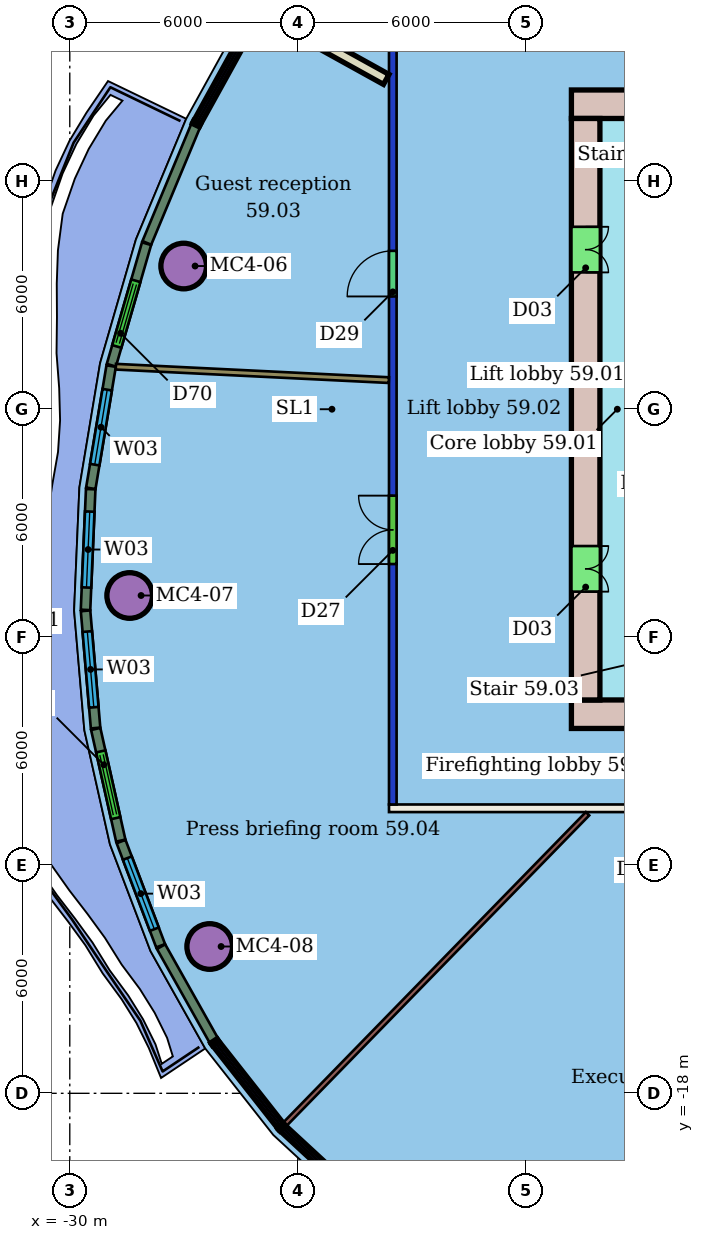
"""IFC4 building model, lengths in metres.
Left out: names, types, materials, properties, quantities, classifications, styles, units other than length and angle.
Written with IfcOpenShell. Run it as: python <this file> out.ifc"""

import sys

from ifc_helpers import new_model, si_unit, direction, frame, frame_2d, origin, origin_2d, place, context, subcontext, project, spatial, rectangle, hollow_circle, extrude, element, fill, save


model = new_model("IFC4")
c1 = context("Model", 3, precision=1e-05, world=origin(), true_north=direction((0.0, 1.0)))
c2 = subcontext(c1, "Body", "Model", "MODEL_VIEW")
j1 = project(units=[si_unit("LENGTHUNIT", "METRE"), si_unit("PLANEANGLEUNIT", "RADIAN")], contexts=[c1])
p1 = place(None, origin())
s1 = spatial("IfcSite", under=j1, at=p1, CompositionType="ELEMENT")
p2 = place(p1, origin())
s2 = spatial("IfcBuilding", under=s1, at=p2, CompositionType="ELEMENT")
p3 = place(p2, frame((0.0, 0.0, 238.9)))
s3 = spatial("IfcBuildingStorey", under=s2, at=p3, CompositionType="ELEMENT", Elevation=238.9)
for number, where, z_axis, x_axis in (
    (1, (-27.003, 3.768, 0.0), (0.0, 0.0, 1.0), (1.0, 0.0, 0.0)),
    (2, (-28.424, -4.901, 0.0), (0.0, 0.0, 1.0), (1.0, 0.0, 0.0)),
    (3, (-26.318, -14.137, 0.0), (0.0, 0.0, 1.0), (1.0, 0.0, 0.0)),
):
    element("IfcColumn", number, at=place(p3, frame(where, z_axis=z_axis, x_axis=x_axis)), inside=s3, PredefinedType="COLUMN", context=c2, shape_type="SweptSolid", body=[
        extrude(hollow_circle(Radius=0.6, WallThickness=0.045, at=origin_2d()), origin(), (0.0, 0.0, 1.0), 3.4),
    ])
p4 = place(p3, frame((9.6, -10.5, 0.0), z_axis=(0.0, 0.0, 1.0), x_axis=(-1.0, 0.0, 0.0)))
e4 = element("IfcWall", 4, at=p4, inside=s3, PredefinedType="PARTITIONING", context=c2, shape_type="SweptSolid", body=[
    extrude(rectangle(XDim=31.2, YDim=0.2, at=frame_2d((15.6, 0.0))), origin(), (0.0, 0.0, 1.0), 3.4),
])
p5 = place(p4, frame((21.354, 0.0, 0.0)))
e5 = element("IfcOpeningElement", 5, at=p5, cuts=e4, PredefinedType="OPENING", context=c2, shape_type="SweptSolid", body=[
    extrude(rectangle(XDim=1.8, YDim=2.1, at=frame_2d((0.9, 1.05))), frame((0.0, 0.11, 0.0), z_axis=(0.0, -1.0, 0.0), x_axis=(1.0, 0.0, 0.0)), (0.0, 0.0, 1.0), 0.22),
])
p6 = place(p4, frame((9.369, 0.0, 0.0)))
e6 = element("IfcOpeningElement", 6, at=p6, cuts=e4, PredefinedType="OPENING", context=c2, shape_type="SweptSolid", body=[
    extrude(rectangle(XDim=1.8, YDim=2.1, at=frame_2d((0.9, 1.05))), frame((0.0, 0.11, 0.0), z_axis=(0.0, -1.0, 0.0), x_axis=(1.0, 0.0, 0.0)), (0.0, 0.0, 1.0), 0.22),
])
p7 = place(p3, frame((-21.5, -10.4, 0.0), z_axis=(0.0, 0.0, 1.0), x_axis=(0.0, 1.0, 0.0)))
e7 = element("IfcWall", 7, at=p7, inside=s3, PredefinedType="PARTITIONING", context=c2, shape_type="SweptSolid", body=[
    extrude(rectangle(XDim=20.8, YDim=0.2, at=frame_2d((10.4, 0.0))), origin(), (0.0, 0.0, 1.0), 3.0),
])
p8 = place(p7, frame((13.367, 0.0, 0.0)))
e8 = element("IfcOpeningElement", 8, at=p8, cuts=e7, PredefinedType="OPENING", context=c2, shape_type="SweptSolid", body=[
    extrude(rectangle(XDim=1.2, YDim=2.4, at=frame_2d((0.6, 1.2))), frame((0.0, 0.11, 0.0), z_axis=(0.0, -1.0, 0.0), x_axis=(1.0, 0.0, 0.0)), (0.0, 0.0, 1.0), 0.22),
])
p9 = place(p7, frame((6.326, 0.0, 0.0)))
e9 = element("IfcOpeningElement", 9, at=p9, cuts=e7, PredefinedType="OPENING", context=c2, shape_type="SweptSolid", body=[
    extrude(rectangle(XDim=1.8, YDim=2.4, at=frame_2d((0.9, 1.2))), frame((0.0, 0.11, 0.0), z_axis=(0.0, -1.0, 0.0), x_axis=(1.0, 0.0, 0.0)), (0.0, 0.0, 1.0), 0.22),
])
p10 = place(p3, frame((-24.895, 10.462, 0.0), z_axis=(0.0, 0.0, 1.0), x_axis=(0.874850568948, -0.484392900455, 0.0)))
e10 = element("IfcWall", 10, at=p10, inside=s3, PredefinedType="PARTITIONING", context=c2, shape_type="SweptSolid", body=[
    extrude(rectangle(XDim=3.683, YDim=0.3, at=frame_2d((1.841, 0.0))), origin(), (0.0, 0.0, 1.0), 3.4),
])
p11 = place(p3, frame((-28.788, 1.119, 0.0), z_axis=(0.0, 0.0, 1.0), x_axis=(0.998796383539, -0.049048794366, 0.0)))
e11 = element("IfcWall", 11, at=p11, inside=s3, PredefinedType="PARTITIONING", context=c2, shape_type="SweptSolid", body=[
    extrude(rectangle(XDim=7.192, YDim=0.15, at=frame_2d((3.596, 0.0))), origin(), (0.0, 0.0, 1.0), 3.4),
])
p12 = place(p3, frame((-24.333, -18.807, 0.0), z_axis=(0.0, 0.0, 1.0), x_axis=(0.698033160895, 0.716065434364, 0.0)))
e12 = element("IfcWall", 12, at=p12, inside=s3, PredefinedType="PARTITIONING", context=c2, shape_type="SweptSolid", body=[
    extrude(rectangle(XDim=11.4, YDim=0.125, at=frame_2d((5.7, 0.0))), origin(), (0.0, 0.0, 1.0), 3.4),
])
p13 = place(p3, frame((-26.688, 7.461, 0.0), z_axis=(0.0, 0.0, 1.0), x_axis=(-0.384516815747, -0.923117987263, 0.0)))
e13 = element("IfcWall", 13, at=p13, inside=s3, PredefinedType="SOLIDWALL", context=c2, shape_type="SweptSolid", body=[
    extrude(rectangle(XDim=3.342, YDim=0.25, at=frame_2d((1.671, 0.0))), origin(), (0.0, 0.0, 1.0), 3.05),
])
p14 = place(p3, frame((-27.98, 4.355, 0.0), z_axis=(0.0, 0.0, 1.0), x_axis=(-0.278253906266, -0.960507555227, 0.0)))
e14 = element("IfcWall", 14, at=p14, inside=s3, PredefinedType="SOLIDWALL", context=c2, shape_type="SweptSolid", body=[
    extrude(rectangle(XDim=3.33, YDim=0.25, at=frame_2d((1.665, 0.0))), origin(), (0.0, 0.0, 1.0), 3.05),
])
p15 = place(p14, frame((1.015, 0.0, 0.0)))
e15 = element("IfcOpeningElement", 15, at=p15, cuts=e14, PredefinedType="OPENING", context=c2, shape_type="SweptSolid", body=[
    extrude(rectangle(XDim=1.8, YDim=2.4, at=frame_2d((0.9, 1.2))), frame((0.0, 0.135, 0.0), z_axis=(0.0, -1.0, 0.0), x_axis=(1.0, 0.0, 0.0)), (0.0, 0.0, 1.0), 0.27),
])
p16 = place(p3, frame((-28.911, 1.135, 0.0), z_axis=(0.0, 0.0, 1.0), x_axis=(-0.164313973675, -0.986408089005, 0.0)))
e16 = element("IfcWall", 16, at=p16, inside=s3, PredefinedType="SOLIDWALL", context=c2, shape_type="SweptSolid", body=[
    extrude(rectangle(XDim=3.26, YDim=0.25, at=frame_2d((1.63, 0.0))), origin(), (0.0, 0.0, 1.0), 3.05),
])
p17 = place(p16, frame((0.63, 0.0, 0.9)))
e17 = element("IfcOpeningElement", 17, at=p17, cuts=e16, PredefinedType="OPENING", context=c2, shape_type="SweptSolid", body=[
    extrude(rectangle(XDim=2.0, YDim=2.1, at=frame_2d((1.0, 1.05))), frame((0.0, 0.135, 0.0), z_axis=(0.0, -1.0, 0.0), x_axis=(1.0, 0.0, 0.0)), (0.0, 0.0, 1.0), 0.27),
])
p18 = place(p3, frame((-29.449, -2.103, 0.0), z_axis=(0.0, 0.0, 1.0), x_axis=(-0.042837542995, -0.99908205114, 0.0)))
e18 = element("IfcWall", 18, at=p18, inside=s3, PredefinedType="SOLIDWALL", context=c2, shape_type="SweptSolid", body=[
    extrude(rectangle(XDim=3.18, YDim=0.25, at=frame_2d((1.59, 0.0))), origin(), (0.0, 0.0, 1.0), 3.05),
])
p19 = place(p18, frame((0.59, 0.0, 0.9)))
e19 = element("IfcOpeningElement", 19, at=p19, cuts=e18, PredefinedType="OPENING", context=c2, shape_type="SweptSolid", body=[
    extrude(rectangle(XDim=2.0, YDim=2.1, at=frame_2d((1.0, 1.05))), frame((0.0, 0.135, 0.0), z_axis=(0.0, -1.0, 0.0), x_axis=(1.0, 0.0, 0.0)), (0.0, 0.0, 1.0), 0.27),
])
p20 = place(p3, frame((-29.585, -5.304, 0.0), z_axis=(0.0, 0.0, 1.0), x_axis=(0.08534968294, -0.996351058424, 0.0)))
e20 = element("IfcWall", 20, at=p20, inside=s3, PredefinedType="SOLIDWALL", context=c2, shape_type="SweptSolid", body=[
    extrude(rectangle(XDim=3.095, YDim=0.25, at=frame_2d((1.547, 0.0))), origin(), (0.0, 0.0, 1.0), 3.05),
])
p21 = place(p20, frame((0.548, 0.0, 0.9)))
e21 = element("IfcOpeningElement", 21, at=p21, cuts=e20, PredefinedType="OPENING", context=c2, shape_type="SweptSolid", body=[
    extrude(rectangle(XDim=2.0, YDim=2.1, at=frame_2d((1.0, 1.05))), frame((0.0, 0.135, 0.0), z_axis=(0.0, -1.0, 0.0), x_axis=(1.0, 0.0, 0.0)), (0.0, 0.0, 1.0), 0.27),
])
p22 = place(p3, frame((-29.317, -8.413, 0.0), z_axis=(0.0, 0.0, 1.0), x_axis=(0.218861882791, -0.975755848694, 0.0)))
e22 = element("IfcWall", 22, at=p22, inside=s3, PredefinedType="SOLIDWALL", context=c2, shape_type="SweptSolid", body=[
    extrude(rectangle(XDim=3.011, YDim=0.25, at=frame_2d((1.505, 0.0))), origin(), (0.0, 0.0, 1.0), 3.05),
])
p23 = place(p22, frame((0.605, 0.0, 0.0)))
e23 = element("IfcOpeningElement", 23, at=p23, cuts=e22, PredefinedType="OPENING", context=c2, shape_type="SweptSolid", body=[
    extrude(rectangle(XDim=1.8, YDim=2.4, at=frame_2d((0.9, 1.2))), frame((0.0, 0.135, 0.0), z_axis=(0.0, -1.0, 0.0), x_axis=(1.0, 0.0, 0.0)), (0.0, 0.0, 1.0), 0.27),
])
p24 = place(p3, frame((-28.651, -11.375, 0.0), z_axis=(0.0, 0.0, 1.0), x_axis=(0.35511592295, -0.934822272556, 0.0)))
e24 = element("IfcWall", 24, at=p24, inside=s3, PredefinedType="SOLIDWALL", context=c2, shape_type="SweptSolid", body=[
    extrude(rectangle(XDim=2.933, YDim=0.25, at=frame_2d((1.466, 0.0))), origin(), (0.0, 0.0, 1.0), 3.05),
])
p25 = place(p24, frame((0.467, 0.0, 0.9)))
e25 = element("IfcOpeningElement", 25, at=p25, cuts=e24, PredefinedType="OPENING", context=c2, shape_type="SweptSolid", body=[
    extrude(rectangle(XDim=2.0, YDim=2.1, at=frame_2d((1.0, 1.05))), frame((0.0, 0.135, 0.0), z_axis=(0.0, -1.0, 0.0), x_axis=(1.0, 0.0, 0.0)), (0.0, 0.0, 1.0), 0.27),
])
p26 = place(p3, frame((-27.598, -14.141, 0.0), z_axis=(0.0, 0.0, 1.0), x_axis=(0.489949521211, -0.871750805371, 0.0)))
e26 = element("IfcWall", 26, at=p26, inside=s3, PredefinedType="SOLIDWALL", context=c2, shape_type="SweptSolid", body=[
    extrude(rectangle(XDim=2.826, YDim=0.25, at=frame_2d((1.413, 0.0))), origin(), (0.0, 0.0, 1.0), 3.05),
])
p27 = place(p3, frame((-6.0, 8.025, 0.0), z_axis=(0.0, 0.0, 1.0), x_axis=(-1.0, 0.0, 0.0)))
e27 = element("IfcWall", 27, at=p27, inside=s3, PredefinedType="SHEAR", context=c2, shape_type="SweptSolid", body=[
    extrude(rectangle(XDim=10.8, YDim=0.75, at=frame_2d((5.4, 0.0))), origin(), (0.0, 0.0, 1.0), 3.3),
])
p28 = place(p27, frame((5.2, 0.0, 0.0)))
e28 = element("IfcOpeningElement", 28, at=p28, cuts=e27, PredefinedType="OPENING", context=c2, shape_type="SweptSolid", body=[
    extrude(rectangle(XDim=1.2, YDim=2.1, at=frame_2d((0.6, 1.05))), frame((0.0, 0.385, 0.0), z_axis=(0.0, -1.0, 0.0), x_axis=(1.0, 0.0, 0.0)), (0.0, 0.0, 1.0), 0.77),
])
p29 = place(p3, frame((-16.8, -8.025, 0.0), z_axis=(0.0, 0.0, 1.0), x_axis=(1.0, 0.0, 0.0)))
e29 = element("IfcWall", 29, at=p29, inside=s3, PredefinedType="SHEAR", context=c2, shape_type="SweptSolid", body=[
    extrude(rectangle(XDim=21.6, YDim=0.75, at=frame_2d((10.8, 0.0))), origin(), (0.0, 0.0, 1.0), 3.3),
])
p30 = place(p29, frame((4.8, 0.0, 0.0)))
e30 = element("IfcOpeningElement", 30, at=p30, cuts=e29, PredefinedType="OPENING", context=c2, shape_type="SweptSolid", body=[
    extrude(rectangle(XDim=1.2, YDim=2.1, at=frame_2d((0.6, 1.05))), frame((0.0, 0.385, 0.0), z_axis=(0.0, -1.0, 0.0), x_axis=(1.0, 0.0, 0.0)), (0.0, 0.0, 1.0), 0.77),
])
p31 = place(p3, frame((-16.425, 7.65, 0.0), z_axis=(0.0, 0.0, 1.0), x_axis=(0.0, -1.0, 0.0)))
e31 = element("IfcWall", 31, at=p31, inside=s3, PredefinedType="SHEAR", context=c2, shape_type="SweptSolid", body=[
    extrude(rectangle(XDim=15.3, YDim=0.75, at=frame_2d((7.65, 0.0))), origin(), (0.0, 0.0, 1.0), 3.3),
])
p32 = place(p31, frame((11.25, 0.0, 0.0)))
e32 = element("IfcOpeningElement", 32, at=p32, cuts=e31, PredefinedType="OPENING", context=c2, shape_type="SweptSolid", body=[
    extrude(rectangle(XDim=1.2, YDim=2.1, at=frame_2d((0.6, 1.05))), frame((0.0, 0.385, 0.0), z_axis=(0.0, -1.0, 0.0), x_axis=(1.0, 0.0, 0.0)), (0.0, 0.0, 1.0), 0.77),
])
p33 = place(p31, frame((2.85, 0.0, 0.0)))
e33 = element("IfcOpeningElement", 33, at=p33, cuts=e31, PredefinedType="OPENING", context=c2, shape_type="SweptSolid", body=[
    extrude(rectangle(XDim=1.2, YDim=2.1, at=frame_2d((0.6, 1.05))), frame((0.0, 0.385, 0.0), z_axis=(0.0, -1.0, 0.0), x_axis=(1.0, 0.0, 0.0)), (0.0, 0.0, 1.0), 0.77),
])
p34 = place(p8, origin())
e34 = element("IfcDoor", 34, at=p34, inside=s3, OperationType="SINGLE_SWING_LEFT", PredefinedType="DOOR", context=c2, shape_type="SweptSolid", body=[
    extrude(rectangle(XDim=1.2, YDim=2.4, at=frame_2d((0.6, 1.2))), frame((0.0, 0.025, 0.0), z_axis=(0.0, -1.0, 0.0), x_axis=(1.0, 0.0, 0.0)), (0.0, 0.0, 1.0), 0.05),
])
fill(e8, e34)
p35 = place(p9, origin())
e35 = element("IfcDoor", 35, at=p35, inside=s3, OperationType="DOUBLE_DOOR_SINGLE_SWING", PredefinedType="DOOR", context=c2, shape_type="SweptSolid", body=[
    extrude(rectangle(XDim=1.8, YDim=2.4, at=frame_2d((0.9, 1.2))), frame((0.0, 0.025, 0.0), z_axis=(0.0, -1.0, 0.0), x_axis=(1.0, 0.0, 0.0)), (0.0, 0.0, 1.0), 0.05),
])
fill(e9, e35)
p36 = place(p15, origin())
e36 = element("IfcDoor", 36, at=p36, inside=s3, OperationType="DOUBLE_DOOR_SLIDING", PredefinedType="DOOR", context=c2, shape_type="SweptSolid", body=[
    extrude(rectangle(XDim=1.8, YDim=2.4, at=frame_2d((0.9, 1.2))), frame((0.0, 0.025, 0.0), z_axis=(0.0, -1.0, 0.0), x_axis=(1.0, 0.0, 0.0)), (0.0, 0.0, 1.0), 0.05),
])
fill(e15, e36)
p37 = place(p17, origin())
e37 = element("IfcWindow", 37, at=p37, inside=s3, PartitioningType="SINGLE_PANEL", PredefinedType="WINDOW", context=c2, shape_type="SweptSolid", body=[
    extrude(rectangle(XDim=2.0, YDim=2.1, at=frame_2d((1.0, 1.05))), frame((0.0, 0.03, 0.0), z_axis=(0.0, -1.0, 0.0), x_axis=(1.0, 0.0, 0.0)), (0.0, 0.0, 1.0), 0.06),
])
fill(e17, e37)
p38 = place(p19, origin())
e38 = element("IfcWindow", 38, at=p38, inside=s3, PartitioningType="SINGLE_PANEL", PredefinedType="WINDOW", context=c2, shape_type="SweptSolid", body=[
    extrude(rectangle(XDim=2.0, YDim=2.1, at=frame_2d((1.0, 1.05))), frame((0.0, 0.03, 0.0), z_axis=(0.0, -1.0, 0.0), x_axis=(1.0, 0.0, 0.0)), (0.0, 0.0, 1.0), 0.06),
])
fill(e19, e38)
p39 = place(p21, origin())
e39 = element("IfcWindow", 39, at=p39, inside=s3, PartitioningType="SINGLE_PANEL", PredefinedType="WINDOW", context=c2, shape_type="SweptSolid", body=[
    extrude(rectangle(XDim=2.0, YDim=2.1, at=frame_2d((1.0, 1.05))), frame((0.0, 0.03, 0.0), z_axis=(0.0, -1.0, 0.0), x_axis=(1.0, 0.0, 0.0)), (0.0, 0.0, 1.0), 0.06),
])
fill(e21, e39)
p40 = place(p23, origin())
e40 = element("IfcDoor", 40, at=p40, inside=s3, OperationType="DOUBLE_DOOR_SLIDING", PredefinedType="DOOR", context=c2, shape_type="SweptSolid", body=[
    extrude(rectangle(XDim=1.8, YDim=2.4, at=frame_2d((0.9, 1.2))), frame((0.0, 0.025, 0.0), z_axis=(0.0, -1.0, 0.0), x_axis=(1.0, 0.0, 0.0)), (0.0, 0.0, 1.0), 0.05),
])
fill(e23, e40)
p41 = place(p25, origin())
e41 = element("IfcWindow", 41, at=p41, inside=s3, PartitioningType="SINGLE_PANEL", PredefinedType="WINDOW", context=c2, shape_type="SweptSolid", body=[
    extrude(rectangle(XDim=2.0, YDim=2.1, at=frame_2d((1.0, 1.05))), frame((0.0, 0.03, 0.0), z_axis=(0.0, -1.0, 0.0), x_axis=(1.0, 0.0, 0.0)), (0.0, 0.0, 1.0), 0.06),
])
fill(e25, e41)
p42 = place(p32, origin())
e42 = element("IfcDoor", 42, at=p42, inside=s3, OperationType="DOUBLE_DOOR_SINGLE_SWING", PredefinedType="NOTDEFINED", context=c2, shape_type="SweptSolid", body=[
    extrude(rectangle(XDim=1.2, YDim=2.1, at=frame_2d((0.6, 1.05))), frame((0.0, 0.025, 0.0), z_axis=(0.0, -1.0, 0.0), x_axis=(1.0, 0.0, 0.0)), (0.0, 0.0, 1.0), 0.05),
])
fill(e32, e42)
p43 = place(p33, origin())
e43 = element("IfcDoor", 43, at=p43, inside=s3, OperationType="DOUBLE_DOOR_SINGLE_SWING", PredefinedType="NOTDEFINED", context=c2, shape_type="SweptSolid", body=[
    extrude(rectangle(XDim=1.2, YDim=2.1, at=frame_2d((0.6, 1.05))), frame((0.0, 0.025, 0.0), z_axis=(0.0, -1.0, 0.0), x_axis=(1.0, 0.0, 0.0)), (0.0, 0.0, 1.0), 0.05),
])
fill(e33, e43)
save(model, sys.argv[1])
